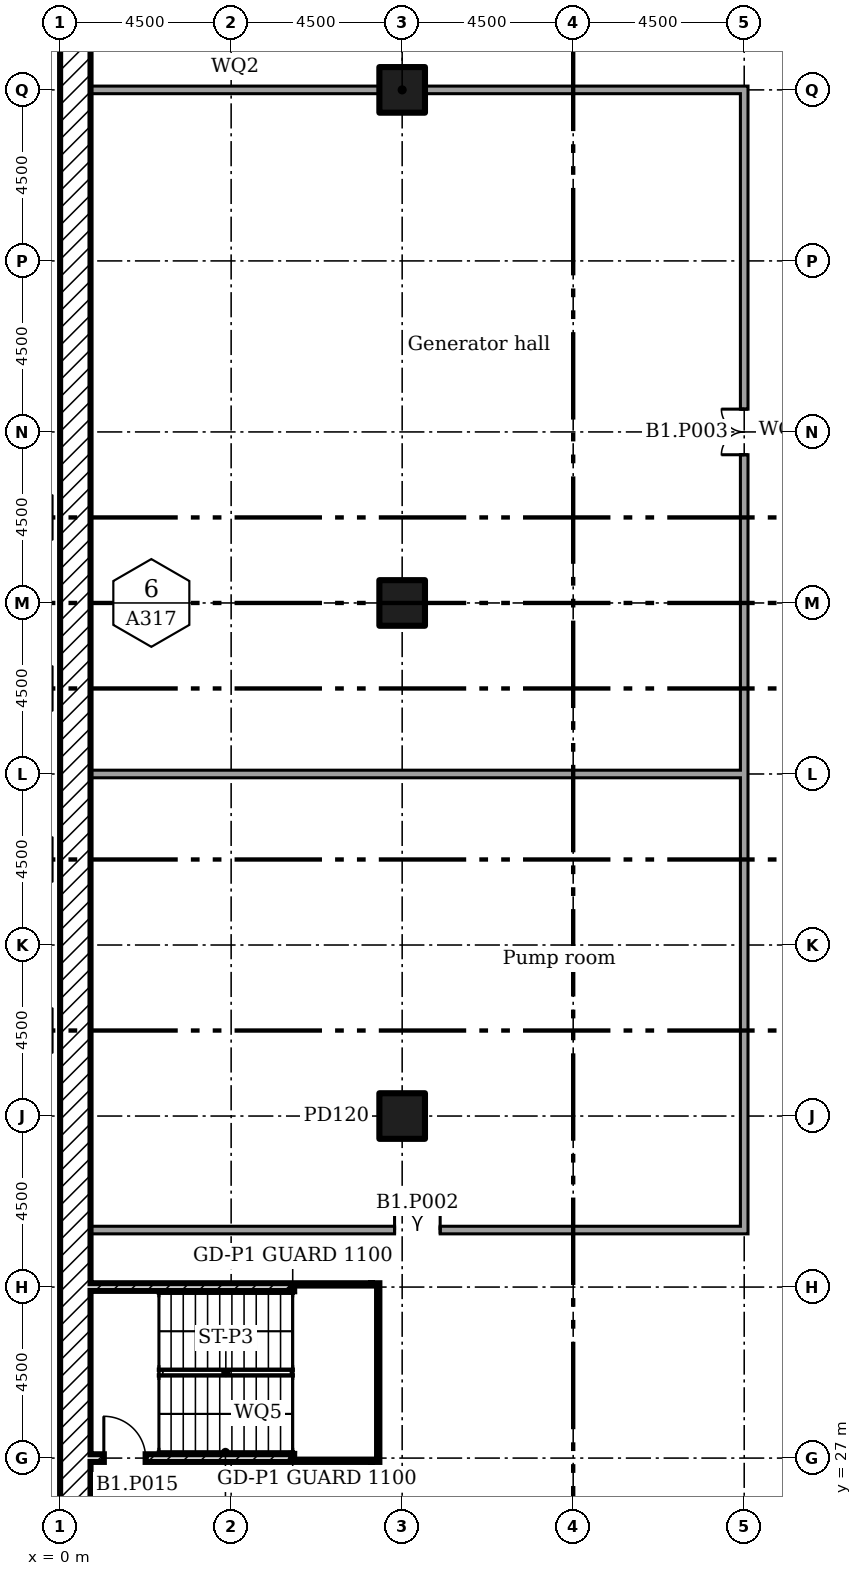
"""IFC4 building model, lengths in metres.
Left out: names, types, materials, properties, quantities, classifications, styles, units other than length and angle.
Written with IfcOpenShell. Run it as: python <this file> out.ifc"""

import sys

from ifc_helpers import new_model, si_unit, direction, frame, frame_2d, origin, origin_2d, place, context, subcontext, project, spatial, rectangle, extrude, element, fill, save


model = new_model("IFC4")
c1 = context("Model", 3, precision=1e-05, world=origin(), true_north=direction((0.0, 1.0)))
c2 = subcontext(c1, "Body", "Model", "MODEL_VIEW")
j1 = project(units=[si_unit("LENGTHUNIT", "METRE"), si_unit("PLANEANGLEUNIT", "RADIAN")], contexts=[c1])
p1 = place(None, origin())
s1 = spatial("IfcSite", under=j1, at=p1, CompositionType="ELEMENT")
p2 = place(p1, origin())
s2 = spatial("IfcBuilding", under=s1, at=p2, CompositionType="ELEMENT")
p3 = place(p2, frame((0.0, 0.0, -4.0)))
s3 = spatial("IfcBuildingStorey", under=s2, at=p3, CompositionType="ELEMENT", Elevation=-4.0)
for number, where in (
    (1, (9.0, 36.0, 0.0)),
    (2, (9.0, 49.5, 0.0)),
    (3, (9.0, 63.0, 0.0)),
):
    element("IfcColumn", number, at=place(p3, frame(where)), inside=s3, PredefinedType="COLUMN", context=c2, shape_type="SweptSolid", body=[
        extrude(rectangle(XDim=1.2, YDim=1.2, at=origin_2d()), origin(), (0.0, 0.0, 1.0), 4.0),
    ])
p4 = place(p3, frame((0.4, 0.8, 0.0), z_axis=(0.0, 0.0, 1.0), x_axis=(0.0, 1.0, 0.0)))
e4 = element("IfcWall", 4, at=p4, inside=s3, PredefinedType="SOLIDWALL", context=c2, shape_type="SweptSolid", body=[
    extrude(rectangle(XDim=97.4, YDim=0.8, at=frame_2d((48.7, 0.0))), origin(), (0.0, 0.0, 1.0), 4.0),
])
p5 = place(p3, frame((0.8, 45.0, 0.0)))
e5 = element("IfcWall", 5, at=p5, inside=s3, PredefinedType="SOLIDWALL", context=c2, shape_type="SweptSolid", body=[
    extrude(rectangle(XDim=17.3, YDim=0.2, at=frame_2d((8.65, 0.0))), origin(), (0.0, 0.0, 1.0), 3.55),
])
p6 = place(p3, frame((18.0, 32.9, 0.0), z_axis=(0.0, 0.0, 1.0), x_axis=(0.0, 1.0, 0.0)))
e6 = element("IfcWall", 6, at=p6, inside=s3, PredefinedType="SOLIDWALL", context=c2, shape_type="SweptSolid", body=[
    extrude(rectangle(XDim=12.0, YDim=0.2, at=frame_2d((6.0, 0.0))), origin(), (0.0, 0.0, 1.0), 3.55),
])
p7 = place(p3, frame((0.8, 33.0, 0.0)))
e7 = element("IfcWall", 7, at=p7, inside=s3, PredefinedType="SOLIDWALL", context=c2, shape_type="SweptSolid", body=[
    extrude(rectangle(XDim=17.1, YDim=0.2, at=frame_2d((8.55, 0.0))), origin(), (0.0, 0.0, 1.0), 3.55),
])
p8 = place(p7, frame((8.0, 0.0, 0.0)))
e8 = element("IfcOpeningElement", 8, at=p8, cuts=e7, PredefinedType="OPENING", context=c2, shape_type="SweptSolid", body=[
    extrude(rectangle(XDim=1.2, YDim=2.1, at=frame_2d((0.6, 1.05))), frame((0.0, 0.11, 0.0), z_axis=(0.0, -1.0, 0.0), x_axis=(1.0, 0.0, 0.0)), (0.0, 0.0, 1.0), 0.22),
])
p9 = place(p3, frame((18.0, 45.0, 0.0), z_axis=(0.0, 0.0, 1.0), x_axis=(0.0, 1.0, 0.0)))
e9 = element("IfcWall", 9, at=p9, inside=s3, PredefinedType="SOLIDWALL", context=c2, shape_type="SweptSolid", body=[
    extrude(rectangle(XDim=18.1, YDim=0.2, at=frame_2d((9.05, 0.0))), origin(), (0.0, 0.0, 1.0), 3.55),
])
p10 = place(p9, frame((8.4, 0.0, 0.0)))
e10 = element("IfcOpeningElement", 10, at=p10, cuts=e9, PredefinedType="OPENING", context=c2, shape_type="SweptSolid", body=[
    extrude(rectangle(XDim=1.2, YDim=2.1, at=frame_2d((0.6, 1.05))), frame((0.0, 0.11, 0.0), z_axis=(0.0, -1.0, 0.0), x_axis=(1.0, 0.0, 0.0)), (0.0, 0.0, 1.0), 0.22),
])
p11 = place(p3, frame((0.8, 63.0, 0.0)))
e11 = element("IfcWall", 11, at=p11, inside=s3, PredefinedType="SOLIDWALL", context=c2, shape_type="SweptSolid", body=[
    extrude(rectangle(XDim=7.605, YDim=0.2, at=frame_2d((3.802, 0.0))), origin(), (0.0, 0.0, 1.0), 3.55),
])
p12 = place(p3, frame((9.595, 63.0, 0.0)))
e12 = element("IfcWall", 12, at=p12, inside=s3, PredefinedType="SOLIDWALL", context=c2, shape_type="SweptSolid", body=[
    extrude(rectangle(XDim=8.305, YDim=0.2, at=frame_2d((4.152, 0.0))), origin(), (0.0, 0.0, 1.0), 3.55),
])
p13 = place(p3, frame((8.3, 26.9, 0.0), z_axis=(0.0, 0.0, 1.0), x_axis=(0.0, 1.0, 0.0)))
e13 = element("IfcWall", 13, at=p13, inside=s3, PredefinedType="SOLIDWALL", context=c2, shape_type="SweptSolid", body=[
    extrude(rectangle(XDim=4.7, YDim=0.2, at=frame_2d((2.35, 0.0))), origin(), (0.0, 0.0, 1.0), 3.55),
])
p14 = place(p3, frame((0.8, 27.0, 0.0)))
e14 = element("IfcWall", 14, at=p14, inside=s3, PredefinedType="SOLIDWALL", context=c2, shape_type="SweptSolid", body=[
    extrude(rectangle(XDim=7.4, YDim=0.2, at=frame_2d((3.7, 0.0))), origin(), (0.0, 0.0, 1.0), 3.55),
])
p15 = place(p14, frame((0.35, 0.0, 0.0)))
e15 = element("IfcOpeningElement", 15, at=p15, cuts=e14, PredefinedType="OPENING", context=c2, shape_type="SweptSolid", body=[
    extrude(rectangle(XDim=1.1, YDim=2.1, at=frame_2d((0.55, 1.05))), frame((0.0, 0.11, 0.0), z_axis=(0.0, -1.0, 0.0), x_axis=(1.0, 0.0, 0.0)), (0.0, 0.0, 1.0), 0.22),
])
p16 = place(p3, frame((0.8, 31.5, 0.0)))
e16 = element("IfcWall", 16, at=p16, inside=s3, PredefinedType="SOLIDWALL", context=c2, shape_type="SweptSolid", body=[
    extrude(rectangle(XDim=7.4, YDim=0.2, at=frame_2d((3.7, 0.0))), origin(), (0.0, 0.0, 1.0), 3.55),
])
for number, where, z_axis, x_axis in (
    (17, (6.22, 31.4, -2.0), (0.0, 0.0, 1.0), (0.0, -1.0, 0.0)),
    (18, (7.6, 31.4, -2.0), (0.0, 0.0, 1.0), (0.0, -1.0, 0.0)),
):
    element("IfcWall", number, at=place(p3, frame(where, z_axis=z_axis, x_axis=x_axis)), inside=s3, PredefinedType="SOLIDWALL", context=c2, shape_type="SweptSolid", body=[
        extrude(rectangle(XDim=4.3, YDim=0.2, at=frame_2d((2.15, 0.0))), origin(), (0.0, 0.0, 1.0), 3.8),
    ])
p17 = place(p8, origin())
e19 = element("IfcDoor", 19, at=p17, inside=s3, OperationType="DOUBLE_DOOR_SINGLE_SWING", PredefinedType="DOOR", context=c2, shape_type="SweptSolid", body=[
    extrude(rectangle(XDim=1.2, YDim=2.1, at=frame_2d((0.6, 1.05))), frame((0.0, 0.025, 0.0), z_axis=(0.0, -1.0, 0.0), x_axis=(1.0, 0.0, 0.0)), (0.0, 0.0, 1.0), 0.05),
])
fill(e8, e19)
p18 = place(p10, origin())
e20 = element("IfcDoor", 20, at=p18, inside=s3, OperationType="DOUBLE_DOOR_SINGLE_SWING", PredefinedType="DOOR", context=c2, shape_type="SweptSolid", body=[
    extrude(rectangle(XDim=1.2, YDim=2.1, at=frame_2d((0.6, 1.05))), frame((0.0, 0.025, 0.0), z_axis=(0.0, -1.0, 0.0), x_axis=(1.0, 0.0, 0.0)), (0.0, 0.0, 1.0), 0.05),
])
fill(e10, e20)
p19 = place(p15, origin())
e21 = element("IfcDoor", 21, at=p19, inside=s3, OperationType="SINGLE_SWING_RIGHT", PredefinedType="DOOR", context=c2, shape_type="SweptSolid", body=[
    extrude(rectangle(XDim=1.1, YDim=2.1, at=frame_2d((0.55, 1.05))), frame((0.0, 0.025, 0.0), z_axis=(0.0, -1.0, 0.0), x_axis=(1.0, 0.0, 0.0)), (0.0, 0.0, 1.0), 0.05),
])
fill(e15, e21)
save(model, sys.argv[1])
